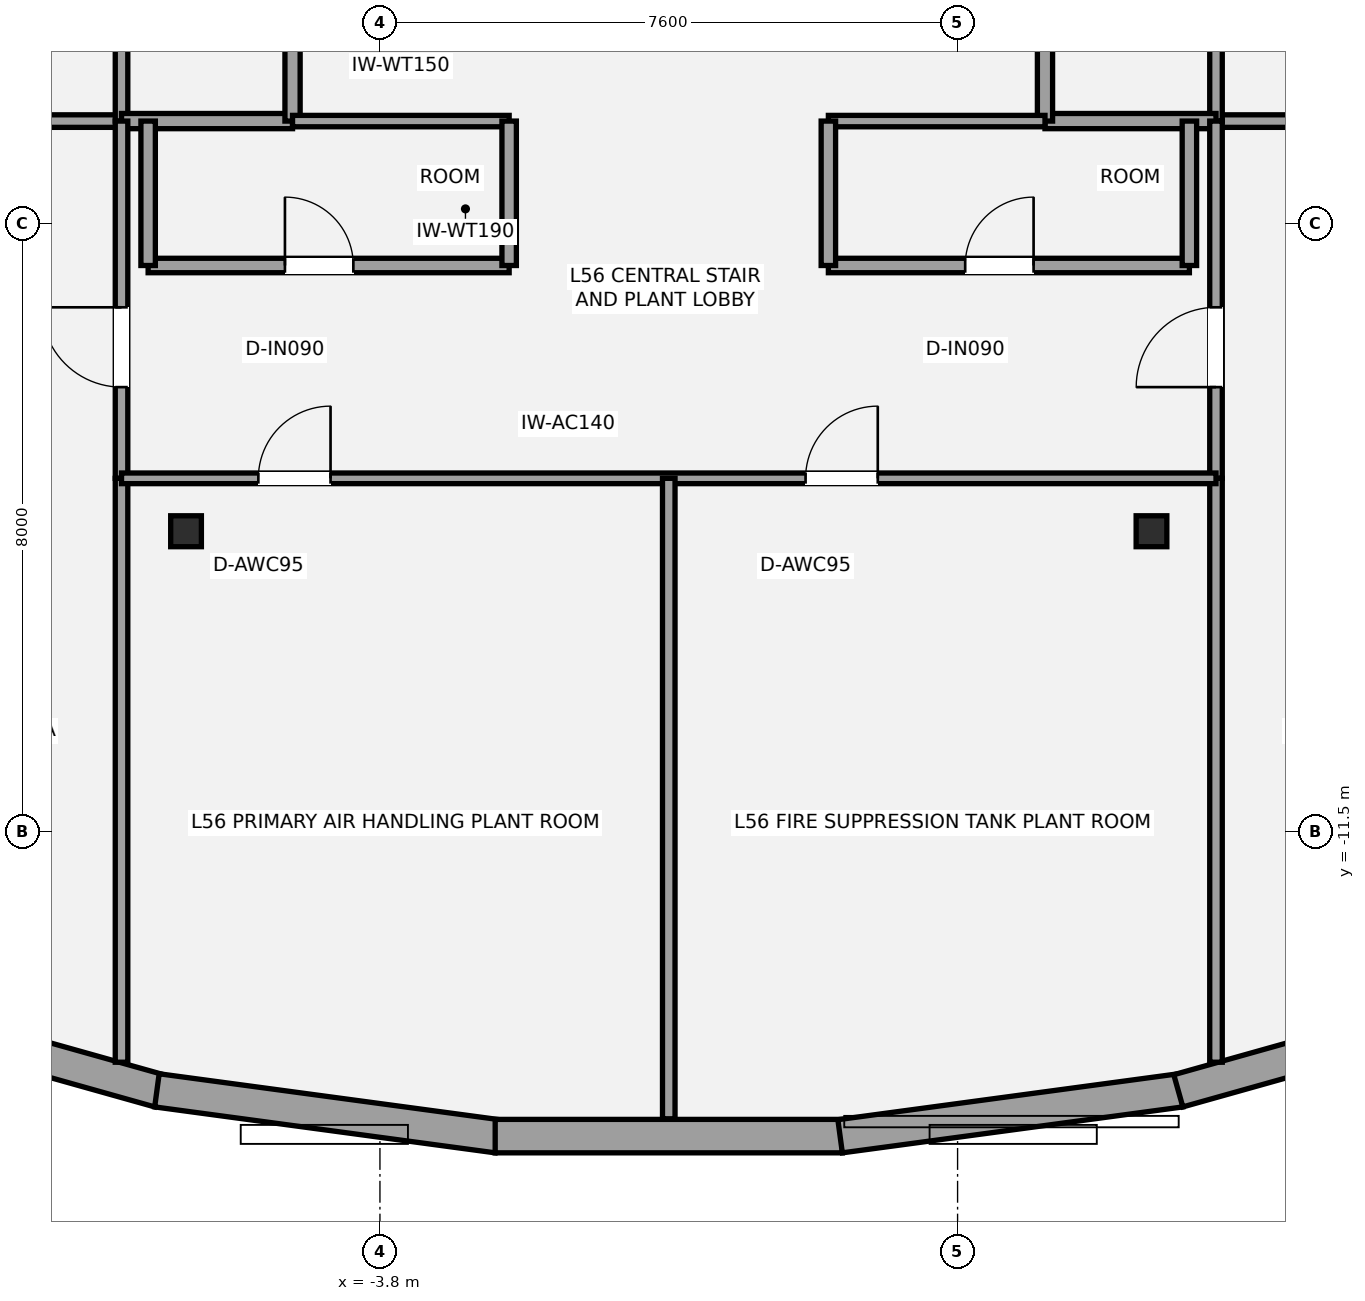
"""IFC4 building model, lengths in metres.
Left out: names, types, materials, properties, quantities, classifications, styles, units other than length and angle.
Written with IfcOpenShell. Run it as: python <this file> out.ifc"""

import sys

from ifc_helpers import new_model, si_unit, direction, frame, frame_2d, origin, origin_2d, place, context, subcontext, project, spatial, rectangle, i_section, extrude, element, fill, save


model = new_model("IFC4")
c1 = context("Model", 3, precision=1e-05, world=origin(), true_north=direction((0.0, 1.0)))
c2 = subcontext(c1, "Body", "Model", "MODEL_VIEW")
j1 = project(units=[si_unit("LENGTHUNIT", "METRE"), si_unit("PLANEANGLEUNIT", "RADIAN")], contexts=[c1])
p1 = place(None, origin())
s1 = spatial("IfcSite", under=j1, at=p1, CompositionType="ELEMENT")
p2 = place(p1, origin())
s2 = spatial("IfcBuilding", under=s1, at=p2, CompositionType="ELEMENT")
p3 = place(p2, frame((0.0, 0.0, 201.4)))
s3 = spatial("IfcBuildingStorey", under=s2, at=p3, CompositionType="ELEMENT", Elevation=201.4)
for number, where, z_axis, x_axis in (
    (1, (-6.351, -7.546, 0.0), (0.0, 0.0, 1.0), (1.0, 0.0, 0.0)),
    (2, (6.351, -7.546, 0.0), (0.0, 0.0, 1.0), (1.0, 0.0, 0.0)),
):
    element("IfcColumn", number, at=place(p3, frame(where, z_axis=z_axis, x_axis=x_axis)), inside=s3, PredefinedType="COLUMN", context=c2, shape_type="SweptSolid", body=[
        extrude(i_section(OverallWidth=0.404, OverallDepth=0.407, WebThickness=0.027, FlangeThickness=0.044, at=origin_2d()), origin(), (0.0, 0.0, 1.0), 4.5),
    ])
p4 = place(p3, frame((-6.704, -14.908, 0.0), z_axis=(0.0, 0.0, 1.0), x_axis=(-0.962743881764, 0.270414899969, 0.0)))
e3 = element("IfcWall", 3, at=p4, inside=s3, PredefinedType="STANDARD", context=c2, shape_type="SweptSolid", body=[
    extrude(rectangle(XDim=4.383, YDim=0.44, at=frame_2d((2.192, 0.0))), origin(), (0.0, 0.0, 1.0), 3.575),
])
p5 = place(p3, frame((-2.254, -15.506, 0.0), z_axis=(0.0, 0.0, 1.0), x_axis=(-0.991025333234, 0.133674189316, 0.0)))
e4 = element("IfcWall", 4, at=p5, inside=s3, PredefinedType="STANDARD", context=c2, shape_type="SweptSolid", body=[
    extrude(rectangle(XDim=4.52, YDim=0.44, at=frame_2d((2.26, 0.0))), origin(), (0.0, 0.0, 1.0), 3.575),
])
p6 = place(p3, frame((2.284, -15.504, 0.0), z_axis=(0.0, 0.0, 1.0), x_axis=(-1.0, 0.0, 0.0)))
e5 = element("IfcWall", 5, at=p6, inside=s3, PredefinedType="STANDARD", context=c2, shape_type="SweptSolid", body=[
    extrude(rectangle(XDim=4.567, YDim=0.44, at=frame_2d((2.284, 0.0))), origin(), (0.0, 0.0, 1.0), 3.575),
])
p7 = place(p3, frame((6.734, -14.902, 0.0), z_axis=(0.0, 0.0, 1.0), x_axis=(-0.991025333234, -0.133674189316, 0.0)))
e6 = element("IfcWall", 6, at=p7, inside=s3, PredefinedType="STANDARD", context=c2, shape_type="SweptSolid", body=[
    extrude(rectangle(XDim=4.52, YDim=0.44, at=frame_2d((2.26, 0.0))), origin(), (0.0, 0.0, 1.0), 3.575),
])
p8 = place(p3, frame((10.924, -13.723, 0.0), z_axis=(0.0, 0.0, 1.0), x_axis=(-0.962743881764, -0.270414899969, 0.0)))
e7 = element("IfcWall", 7, at=p8, inside=s3, PredefinedType="STANDARD", context=c2, shape_type="SweptSolid", body=[
    extrude(rectangle(XDim=4.383, YDim=0.44, at=frame_2d((2.192, 0.0))), origin(), (0.0, 0.0, 1.0), 3.575),
])
p9 = place(p3, frame((-13.45, -2.15, 0.0), z_axis=(0.0, 0.0, 1.0), x_axis=(1.0, 0.0, 0.0)))
e8 = element("IfcWall", 8, at=p9, inside=s3, PredefinedType="PARTITIONING", context=c2, shape_type="SweptSolid", body=[
    extrude(rectangle(XDim=6.25, YDim=0.165, at=frame_2d((3.125, 0.0))), origin(), (0.0, 0.0, 1.0), 4.28),
])
p10 = place(p9, frame((2.6, 0.0, 0.0)))
e9 = element("IfcOpeningElement", 9, at=p10, cuts=e8, PredefinedType="OPENING", context=c2, shape_type="SweptSolid", body=[
    extrude(rectangle(XDim=1.05, YDim=2.15, at=frame_2d((0.525, 1.075))), frame((0.0, 0.093, 0.0), z_axis=(0.0, -1.0, 0.0), x_axis=(1.0, 0.0, 0.0)), (0.0, 0.0, 1.0), 0.185),
])
p11 = place(p3, frame((-7.2, -2.15, 0.0), z_axis=(0.0, 0.0, 1.0), x_axis=(0.0, 1.0, 0.0)))
e10 = element("IfcWall", 10, at=p11, inside=s3, PredefinedType="PARTITIONING", context=c2, shape_type="SweptSolid", body=[
    extrude(rectangle(XDim=3.4, YDim=0.165, at=frame_2d((1.7, 0.0))), origin(), (0.0, 0.0, 1.0), 4.28),
])
p12 = place(p3, frame((-7.2, -2.15, 0.0), z_axis=(0.0, 0.0, 1.0), x_axis=(1.0, 0.0, 0.0)))
e11 = element("IfcWall", 11, at=p12, inside=s3, PredefinedType="SOLIDWALL", context=c2, shape_type="SweptSolid", body=[
    extrude(rectangle(XDim=2.25, YDim=0.2, at=frame_2d((1.125, 0.0))), origin(), (0.0, 0.0, 1.0), 2.47),
])
p13 = place(p3, frame((-4.95, -2.15, 0.0), z_axis=(0.0, 0.0, 1.0), x_axis=(0.0, 1.0, 0.0)))
e12 = element("IfcWall", 12, at=p13, inside=s3, PredefinedType="SOLIDWALL", context=c2, shape_type="SweptSolid", body=[
    extrude(rectangle(XDim=3.4, YDim=0.2, at=frame_2d((1.7, 0.0))), origin(), (0.0, 0.0, 1.0), 2.47),
])
p14 = place(p13, frame((0.95, 0.0, 0.0)))
e13 = element("IfcOpeningElement", 13, at=p14, cuts=e12, PredefinedType="OPENING", context=c2, shape_type="SweptSolid", body=[
    extrude(rectangle(XDim=0.75, YDim=2.1, at=frame_2d((0.375, 1.05))), frame((0.0, 0.11, 0.0), z_axis=(0.0, -1.0, 0.0), x_axis=(1.0, 0.0, 0.0)), (0.0, 0.0, 1.0), 0.22),
])
p15 = place(p3, frame((7.2, -2.15, 0.0), z_axis=(0.0, 0.0, 1.0), x_axis=(1.0, 0.0, 0.0)))
e14 = element("IfcWall", 14, at=p15, inside=s3, PredefinedType="PARTITIONING", context=c2, shape_type="SweptSolid", body=[
    extrude(rectangle(XDim=6.25, YDim=0.165, at=frame_2d((3.125, 0.0))), origin(), (0.0, 0.0, 1.0), 4.28),
])
p16 = place(p15, frame((1.4, 0.0, 0.0)))
e15 = element("IfcOpeningElement", 15, at=p16, cuts=e14, PredefinedType="OPENING", context=c2, shape_type="SweptSolid", body=[
    extrude(rectangle(XDim=1.05, YDim=2.15, at=frame_2d((0.525, 1.075))), frame((0.0, 0.093, 0.0), z_axis=(0.0, -1.0, 0.0), x_axis=(1.0, 0.0, 0.0)), (0.0, 0.0, 1.0), 0.185),
])
p17 = place(p3, frame((7.2, -2.15, 0.0), z_axis=(0.0, 0.0, 1.0), x_axis=(0.0, 1.0, 0.0)))
e16 = element("IfcWall", 16, at=p17, inside=s3, PredefinedType="PARTITIONING", context=c2, shape_type="SweptSolid", body=[
    extrude(rectangle(XDim=3.4, YDim=0.165, at=frame_2d((1.7, 0.0))), origin(), (0.0, 0.0, 1.0), 4.28),
])
p18 = place(p3, frame((4.95, -2.15, 0.0), z_axis=(0.0, 0.0, 1.0), x_axis=(1.0, 0.0, 0.0)))
e17 = element("IfcWall", 17, at=p18, inside=s3, PredefinedType="SOLIDWALL", context=c2, shape_type="SweptSolid", body=[
    extrude(rectangle(XDim=2.25, YDim=0.2, at=frame_2d((1.125, 0.0))), origin(), (0.0, 0.0, 1.0), 2.47),
])
p19 = place(p3, frame((4.95, -2.15, 0.0), z_axis=(0.0, 0.0, 1.0), x_axis=(0.0, 1.0, 0.0)))
e18 = element("IfcWall", 18, at=p19, inside=s3, PredefinedType="SOLIDWALL", context=c2, shape_type="SweptSolid", body=[
    extrude(rectangle(XDim=3.4, YDim=0.2, at=frame_2d((1.7, 0.0))), origin(), (0.0, 0.0, 1.0), 2.47),
])
p20 = place(p19, frame((0.95, 0.0, 0.0)))
e19 = element("IfcOpeningElement", 19, at=p20, cuts=e18, PredefinedType="OPENING", context=c2, shape_type="SweptSolid", body=[
    extrude(rectangle(XDim=0.75, YDim=2.1, at=frame_2d((0.375, 1.05))), frame((0.0, 0.11, 0.0), z_axis=(0.0, -1.0, 0.0), x_axis=(1.0, 0.0, 0.0)), (0.0, 0.0, 1.0), 0.22),
])
p21 = place(p3, frame((-6.85, -4.05, 0.0), z_axis=(0.0, 0.0, 1.0), x_axis=(1.0, 0.0, 0.0)))
e20 = element("IfcWall", 20, at=p21, inside=s3, PredefinedType="PLUMBINGWALL", context=c2, shape_type="SweptSolid", body=[
    extrude(rectangle(XDim=4.75, YDim=0.19, at=frame_2d((2.375, 0.0))), origin(), (0.0, 0.0, 1.0), 2.47),
])
p22 = place(p21, frame((1.8, 0.0, 0.0)))
e21 = element("IfcOpeningElement", 21, at=p22, cuts=e20, PredefinedType="OPENING", context=c2, shape_type="SweptSolid", body=[
    extrude(rectangle(XDim=0.9, YDim=2.1, at=frame_2d((0.45, 1.05))), frame((0.0, 0.105, 0.0), z_axis=(0.0, -1.0, 0.0), x_axis=(1.0, 0.0, 0.0)), (0.0, 0.0, 1.0), 0.21),
])
p23 = place(p3, frame((-4.95, -2.15, 0.0), z_axis=(0.0, 0.0, 1.0), x_axis=(1.0, 0.0, 0.0)))
e22 = element("IfcWall", 22, at=p23, inside=s3, PredefinedType="PLUMBINGWALL", context=c2, shape_type="SweptSolid", body=[
    extrude(rectangle(XDim=2.85, YDim=0.15, at=frame_2d((1.425, 0.0))), origin(), (0.0, 0.0, 1.0), 4.28),
])
for number, where, z_axis, x_axis in (
    (23, (-6.85, -4.05, 0.0), (0.0, 0.0, 1.0), (0.0, 1.0, 0.0)),
    (24, (-2.1, -4.05, 0.0), (0.0, 0.0, 1.0), (0.0, 1.0, 0.0)),
):
    element("IfcWall", number, at=place(p3, frame(where, z_axis=z_axis, x_axis=x_axis)), inside=s3, PredefinedType="PLUMBINGWALL", context=c2, shape_type="SweptSolid", body=[
        extrude(rectangle(XDim=1.9, YDim=0.19, at=frame_2d((0.95, 0.0))), origin(), (0.0, 0.0, 1.0), 4.28),
    ])
p24 = place(p3, frame((2.1, -4.05, 0.0), z_axis=(0.0, 0.0, 1.0), x_axis=(1.0, 0.0, 0.0)))
e25 = element("IfcWall", 25, at=p24, inside=s3, PredefinedType="PLUMBINGWALL", context=c2, shape_type="SweptSolid", body=[
    extrude(rectangle(XDim=4.75, YDim=0.19, at=frame_2d((2.375, 0.0))), origin(), (0.0, 0.0, 1.0), 2.47),
])
p25 = place(p24, frame((1.8, 0.0, 0.0)))
e26 = element("IfcOpeningElement", 26, at=p25, cuts=e25, PredefinedType="OPENING", context=c2, shape_type="SweptSolid", body=[
    extrude(rectangle(XDim=0.9, YDim=2.1, at=frame_2d((0.45, 1.05))), frame((0.0, 0.105, 0.0), z_axis=(0.0, -1.0, 0.0), x_axis=(1.0, 0.0, 0.0)), (0.0, 0.0, 1.0), 0.21),
])
p26 = place(p3, frame((2.1, -2.15, 0.0), z_axis=(0.0, 0.0, 1.0), x_axis=(1.0, 0.0, 0.0)))
e27 = element("IfcWall", 27, at=p26, inside=s3, PredefinedType="PLUMBINGWALL", context=c2, shape_type="SweptSolid", body=[
    extrude(rectangle(XDim=2.85, YDim=0.15, at=frame_2d((1.425, 0.0))), origin(), (0.0, 0.0, 1.0), 3.733),
])
for number, where, z_axis, x_axis in (
    (28, (2.1, -4.05, 0.0), (0.0, 0.0, 1.0), (0.0, 1.0, 0.0)),
    (29, (6.85, -4.05, 0.0), (0.0, 0.0, 1.0), (0.0, 1.0, 0.0)),
):
    element("IfcWall", number, at=place(p3, frame(where, z_axis=z_axis, x_axis=x_axis)), inside=s3, PredefinedType="PLUMBINGWALL", context=c2, shape_type="SweptSolid", body=[
        extrude(rectangle(XDim=1.9, YDim=0.19, at=frame_2d((0.95, 0.0))), origin(), (0.0, 0.0, 1.0), 4.28),
    ])
p27 = place(p3, frame((-7.2, -6.85, 0.0), z_axis=(0.0, 0.0, 1.0), x_axis=(0.0, 1.0, 0.0)))
e30 = element("IfcWall", 30, at=p27, inside=s3, PredefinedType="PARTITIONING", context=c2, shape_type="SweptSolid", body=[
    extrude(rectangle(XDim=4.7, YDim=0.165, at=frame_2d((2.35, 0.0))), origin(), (0.0, 0.0, 1.0), 3.733),
])
p28 = place(p27, frame((1.2, 0.0, 0.0)))
e31 = element("IfcOpeningElement", 31, at=p28, cuts=e30, PredefinedType="OPENING", context=c2, shape_type="SweptSolid", body=[
    extrude(rectangle(XDim=1.05, YDim=2.15, at=frame_2d((0.525, 1.075))), frame((0.0, 0.093, 0.0), z_axis=(0.0, -1.0, 0.0), x_axis=(1.0, 0.0, 0.0)), (0.0, 0.0, 1.0), 0.185),
])
p29 = place(p3, frame((7.2, -6.85, 0.0), z_axis=(0.0, 0.0, 1.0), x_axis=(0.0, 1.0, 0.0)))
e32 = element("IfcWall", 32, at=p29, inside=s3, PredefinedType="PARTITIONING", context=c2, shape_type="SweptSolid", body=[
    extrude(rectangle(XDim=4.7, YDim=0.165, at=frame_2d((2.35, 0.0))), origin(), (0.0, 0.0, 1.0), 3.733),
])
p30 = place(p29, frame((1.2, 0.0, 0.0)))
e33 = element("IfcOpeningElement", 33, at=p30, cuts=e32, PredefinedType="OPENING", context=c2, shape_type="SweptSolid", body=[
    extrude(rectangle(XDim=1.05, YDim=2.15, at=frame_2d((0.525, 1.075))), frame((0.0, 0.093, 0.0), z_axis=(0.0, -1.0, 0.0), x_axis=(1.0, 0.0, 0.0)), (0.0, 0.0, 1.0), 0.185),
])
p31 = place(p3, frame((-7.2, -14.532, 0.0), z_axis=(0.0, 0.0, 1.0), x_axis=(0.0, 1.0, 0.0)))
e34 = element("IfcWall", 34, at=p31, inside=s3, PredefinedType="PARTITIONING", context=c2, shape_type="SweptSolid", body=[
    extrude(rectangle(XDim=7.682, YDim=0.165, at=frame_2d((3.841, 0.0))), origin(), (0.0, 0.0, 1.0), 3.733),
])
p32 = place(p3, frame((7.2, -14.532, 0.0), z_axis=(0.0, 0.0, 1.0), x_axis=(0.0, 1.0, 0.0)))
e35 = element("IfcWall", 35, at=p32, inside=s3, PredefinedType="PARTITIONING", context=c2, shape_type="SweptSolid", body=[
    extrude(rectangle(XDim=7.682, YDim=0.165, at=frame_2d((3.841, 0.0))), origin(), (0.0, 0.0, 1.0), 4.28),
])
p33 = place(p3, frame((-7.2, -6.85, 0.0), z_axis=(0.0, 0.0, 1.0), x_axis=(1.0, 0.0, 0.0)))
e36 = element("IfcWall", 36, at=p33, inside=s3, PredefinedType="PARTITIONING", context=c2, shape_type="SweptSolid", body=[
    extrude(rectangle(XDim=14.4, YDim=0.14, at=frame_2d((7.2, 0.0))), origin(), (0.0, 0.0, 1.0), 2.47),
])
p34 = place(p33, frame((1.8, 0.0, 0.0)))
e37 = element("IfcOpeningElement", 37, at=p34, cuts=e36, PredefinedType="OPENING", context=c2, shape_type="SweptSolid", body=[
    extrude(rectangle(XDim=0.95, YDim=2.15, at=frame_2d((0.475, 1.075))), frame((0.0, 0.08, 0.0), z_axis=(0.0, -1.0, 0.0), x_axis=(1.0, 0.0, 0.0)), (0.0, 0.0, 1.0), 0.16),
])
p35 = place(p33, frame((9.0, 0.0, 0.0)))
e38 = element("IfcOpeningElement", 38, at=p35, cuts=e36, PredefinedType="OPENING", context=c2, shape_type="SweptSolid", body=[
    extrude(rectangle(XDim=0.95, YDim=2.15, at=frame_2d((0.475, 1.075))), frame((0.0, 0.08, 0.0), z_axis=(0.0, -1.0, 0.0), x_axis=(1.0, 0.0, 0.0)), (0.0, 0.0, 1.0), 0.16),
])
p36 = place(p3, frame((0.0, -15.276, 0.0), z_axis=(0.0, 0.0, 1.0), x_axis=(0.0, 1.0, 0.0)))
e39 = element("IfcWall", 39, at=p36, inside=s3, PredefinedType="PARTITIONING", context=c2, shape_type="SweptSolid", body=[
    extrude(rectangle(XDim=8.426, YDim=0.165, at=frame_2d((4.213, 0.0))), origin(), (0.0, 0.0, 1.0), 3.733),
])
p37 = place(p22, origin())
e40 = element("IfcDoor", 40, at=p37, inside=s3, OperationType="SINGLE_SWING_LEFT", PredefinedType="DOOR", context=c2, shape_type="SweptSolid", body=[
    extrude(rectangle(XDim=0.9, YDim=2.1, at=frame_2d((0.45, 1.05))), frame((0.0, 0.025, 0.0), z_axis=(0.0, -1.0, 0.0), x_axis=(1.0, 0.0, 0.0)), (0.0, 0.0, 1.0), 0.05),
])
fill(e21, e40)
p38 = place(p25, origin())
e41 = element("IfcDoor", 41, at=p38, inside=s3, OperationType="SINGLE_SWING_RIGHT", PredefinedType="DOOR", context=c2, shape_type="SweptSolid", body=[
    extrude(rectangle(XDim=0.9, YDim=2.1, at=frame_2d((0.45, 1.05))), frame((0.0, 0.025, 0.0), z_axis=(0.0, -1.0, 0.0), x_axis=(1.0, 0.0, 0.0)), (0.0, 0.0, 1.0), 0.05),
])
fill(e26, e41)
p39 = place(p28, origin())
e42 = element("IfcDoor", 42, at=p39, inside=s3, OperationType="SINGLE_SWING_RIGHT", PredefinedType="DOOR", context=c2, shape_type="SweptSolid", body=[
    extrude(rectangle(XDim=1.05, YDim=2.15, at=frame_2d((0.525, 1.075))), frame((0.0, 0.025, 0.0), z_axis=(0.0, -1.0, 0.0), x_axis=(1.0, 0.0, 0.0)), (0.0, 0.0, 1.0), 0.05),
])
fill(e31, e42)
p40 = place(p30, origin())
e43 = element("IfcDoor", 43, at=p40, inside=s3, OperationType="SINGLE_SWING_LEFT", PredefinedType="DOOR", context=c2, shape_type="SweptSolid", body=[
    extrude(rectangle(XDim=1.05, YDim=2.15, at=frame_2d((0.525, 1.075))), frame((0.0, 0.025, 0.0), z_axis=(0.0, -1.0, 0.0), x_axis=(1.0, 0.0, 0.0)), (0.0, 0.0, 1.0), 0.05),
])
fill(e33, e43)
p41 = place(p34, origin())
e44 = element("IfcDoor", 44, at=p41, inside=s3, OperationType="SINGLE_SWING_RIGHT", PredefinedType="DOOR", context=c2, shape_type="SweptSolid", body=[
    extrude(rectangle(XDim=0.95, YDim=2.15, at=frame_2d((0.475, 1.075))), frame((0.0, 0.025, 0.0), z_axis=(0.0, -1.0, 0.0), x_axis=(1.0, 0.0, 0.0)), (0.0, 0.0, 1.0), 0.05),
])
fill(e37, e44)
p42 = place(p35, origin())
e45 = element("IfcDoor", 45, at=p42, inside=s3, OperationType="SINGLE_SWING_RIGHT", PredefinedType="DOOR", context=c2, shape_type="SweptSolid", body=[
    extrude(rectangle(XDim=0.95, YDim=2.15, at=frame_2d((0.475, 1.075))), frame((0.0, 0.025, 0.0), z_axis=(0.0, -1.0, 0.0), x_axis=(1.0, 0.0, 0.0)), (0.0, 0.0, 1.0), 0.05),
])
fill(e38, e45)
save(model, sys.argv[1])
